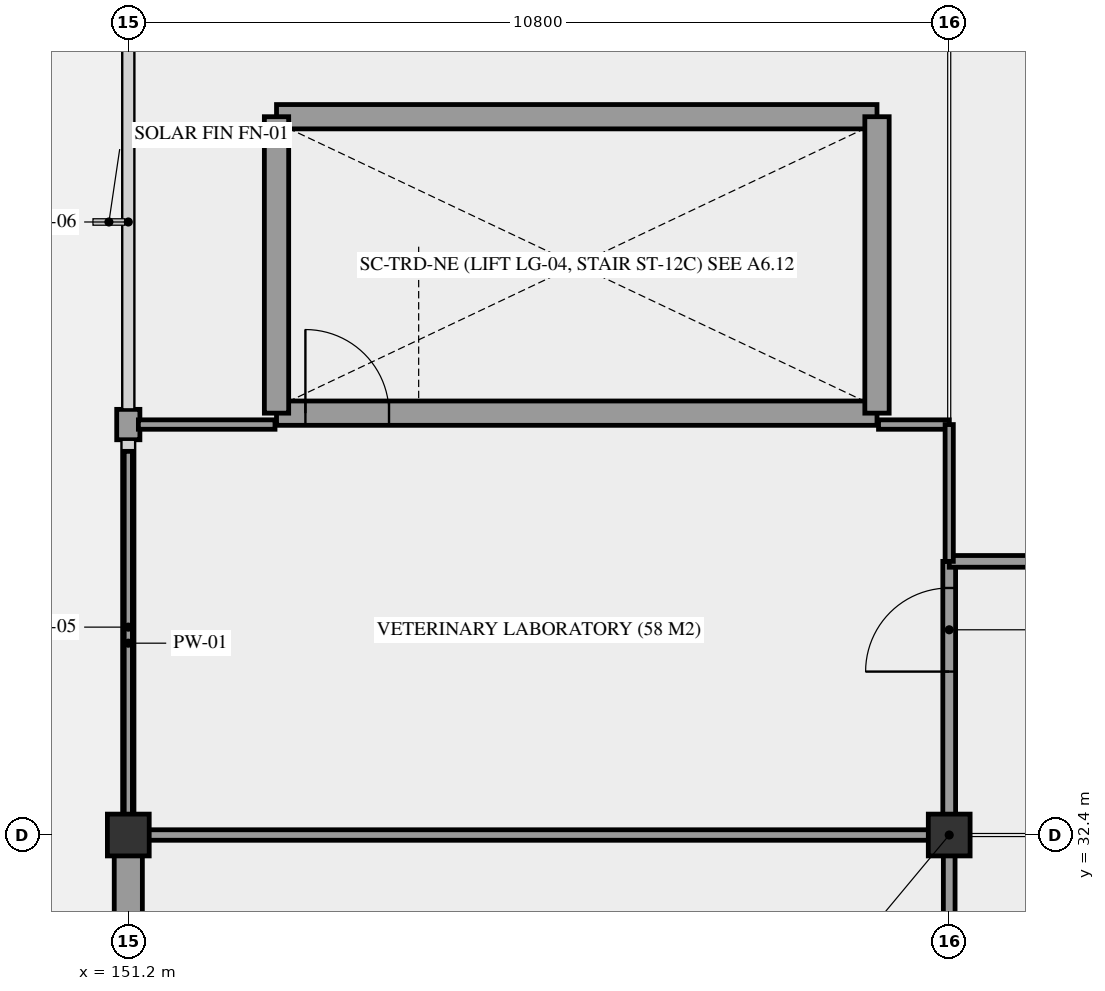
"""IFC4 building model, lengths in metres.
Left out: names, types, materials, properties, quantities, classifications, styles, units other than length and angle.
Written with IfcOpenShell. Run it as: python <this file> out.ifc"""

import sys

from ifc_helpers import new_model, si_unit, direction, frame, frame_2d, origin, origin_2d, place, context, subcontext, project, spatial, rectangle, extrude, element, fill, save


model = new_model("IFC4")
c1 = context("Model", 3, precision=1e-05, world=origin(), true_north=direction((0.0, 1.0)))
c2 = subcontext(c1, "Body", "Model", "MODEL_VIEW")
j1 = project(units=[si_unit("LENGTHUNIT", "METRE"), si_unit("PLANEANGLEUNIT", "RADIAN")], contexts=[c1])
p1 = place(None, origin())
s1 = spatial("IfcSite", under=j1, at=p1, CompositionType="ELEMENT")
p2 = place(p1, origin())
s2 = spatial("IfcBuilding", under=s1, at=p2, CompositionType="ELEMENT")
p3 = place(p2, frame((0.0, 0.0, 14.76)))
s3 = spatial("IfcBuildingStorey", under=s2, at=p3, CompositionType="ELEMENT", Elevation=14.76)
for number, where, z_axis, x_axis in (
    (1, (151.2, 32.4, 0.0), (0.0, 0.0, 1.0), (1.0, 0.0, 0.0)),
    (2, (162.0, 32.4, 0.0), (0.0, 0.0, 1.0), (1.0, 0.0, 0.0)),
):
    element("IfcColumn", number, at=place(p3, frame(where, z_axis=z_axis, x_axis=x_axis)), inside=s3, PredefinedType="COLUMN", context=c2, shape_type="SweptSolid", body=[
        extrude(rectangle(XDim=0.55, YDim=0.55, at=origin_2d()), origin(), (0.0, 0.0, 1.0), 4.32),
    ])
p4 = place(p3, frame((151.2, 21.87, 0.0), z_axis=(0.0, 0.0, 1.0), x_axis=(0.0, 1.0, 0.0)))
e3 = element("IfcWall", 3, at=p4, inside=s3, PredefinedType="STANDARD", context=c2, shape_type="SweptSolid", body=[
    extrude(rectangle(XDim=10.26, YDim=0.37, at=frame_2d((5.13, 0.0))), origin(), (0.0, 0.0, 1.0), 3.17),
])
p5 = place(p4, frame((6.8, 0.0, 0.0)))
e4 = element("IfcOpeningElement", 4, at=p5, cuts=e3, PredefinedType="OPENING", context=c2, shape_type="SweptSolid", body=[
    extrude(rectangle(XDim=1.76, YDim=2.2, at=frame_2d((0.88, 1.1))), frame((0.0, 0.195, 0.0), z_axis=(0.0, -1.0, 0.0), x_axis=(1.0, 0.0, 0.0)), (0.0, 0.0, 1.0), 0.39),
])
p6 = place(p3, frame((151.2, 37.6, 0.0), z_axis=(0.0, 0.0, 1.0), x_axis=(0.0, 1.0, 0.0)))
e5 = element("IfcWall", 5, at=p6, inside=s3, PredefinedType="STANDARD", context=c2, shape_type="SweptSolid", body=[
    extrude(rectangle(XDim=0.4, YDim=0.305, at=frame_2d((0.2, 0.0))), origin(), (0.0, 0.0, 1.0), 3.17),
])
p7 = place(p3, frame((153.15, 37.95, 0.0), z_axis=(0.0, 0.0, 1.0), x_axis=(1.0, 0.0, 0.0)))
e6 = element("IfcWall", 6, at=p7, inside=s3, PredefinedType="SHEAR", context=c2, shape_type="SweptSolid", body=[
    extrude(rectangle(XDim=7.9, YDim=0.32, at=frame_2d((3.95, 0.0))), origin(), (0.0, 0.0, 1.0), 4.32),
])
p8 = place(p7, frame((0.38, 0.0, 0.0)))
e7 = element("IfcOpeningElement", 7, at=p8, cuts=e6, PredefinedType="OPENING", context=c2, shape_type="SweptSolid", body=[
    extrude(rectangle(XDim=1.1, YDim=2.2, at=frame_2d((0.55, 1.1))), frame((0.0, 0.17, 0.0), z_axis=(0.0, -1.0, 0.0), x_axis=(1.0, 0.0, 0.0)), (0.0, 0.0, 1.0), 0.34),
])
p9 = place(p3, frame((153.15, 41.85, 0.0), z_axis=(0.0, 0.0, 1.0), x_axis=(1.0, 0.0, 0.0)))
e8 = element("IfcWall", 8, at=p9, inside=s3, PredefinedType="SHEAR", context=c2, shape_type="SweptSolid", body=[
    extrude(rectangle(XDim=7.9, YDim=0.32, at=frame_2d((3.95, 0.0))), origin(), (0.0, 0.0, 1.0), 4.32),
])
for number, where, z_axis, x_axis in (
    (9, (153.15, 37.95, 0.0), (0.0, 0.0, 1.0), (0.0, 1.0, 0.0)),
    (10, (161.05, 37.95, 0.0), (0.0, 0.0, 1.0), (0.0, 1.0, 0.0)),
):
    element("IfcWall", number, at=place(p3, frame(where, z_axis=z_axis, x_axis=x_axis)), inside=s3, PredefinedType="SHEAR", context=c2, shape_type="SweptSolid", body=[
        extrude(rectangle(XDim=3.9, YDim=0.32, at=frame_2d((1.95, 0.0))), origin(), (0.0, 0.0, 1.0), 4.32),
    ])
p10 = place(p3, frame((162.0, 21.6, 0.0), z_axis=(0.0, 0.0, 1.0), x_axis=(0.0, 1.0, 0.0)))
e11 = element("IfcWall", 11, at=p10, inside=s3, PredefinedType="PARTITIONING", context=c2, shape_type="SweptSolid", body=[
    extrude(rectangle(XDim=10.8, YDim=0.154, at=frame_2d((5.4, 0.0))), origin(), (0.0, 0.0, 1.0), 2.87),
])
p11 = place(p10, frame((8.356, 0.0, 0.0)))
e12 = element("IfcOpeningElement", 12, at=p11, cuts=e11, PredefinedType="OPENING", context=c2, shape_type="SweptSolid", body=[
    extrude(rectangle(XDim=1.0, YDim=2.15, at=frame_2d((0.5, 1.075))), frame((0.0, 0.087, 0.0), z_axis=(0.0, -1.0, 0.0), x_axis=(1.0, 0.0, 0.0)), (0.0, 0.0, 1.0), 0.174),
])
p12 = place(p3, frame((162.0, 32.4, 0.0), z_axis=(0.0, 0.0, 1.0), x_axis=(0.0, 1.0, 0.0)))
e13 = element("IfcWall", 13, at=p12, inside=s3, PredefinedType="PARTITIONING", context=c2, shape_type="SweptSolid", body=[
    extrude(rectangle(XDim=3.6, YDim=0.168, at=frame_2d((1.8, 0.0))), origin(), (0.0, 0.0, 1.0), 2.87),
])
p13 = place(p12, frame((2.15, 0.0, 0.0)))
e14 = element("IfcOpeningElement", 14, at=p13, cuts=e13, PredefinedType="OPENING", context=c2, shape_type="SweptSolid", body=[
    extrude(rectangle(XDim=1.1, YDim=2.2, at=frame_2d((0.55, 1.1))), frame((0.0, 0.094, 0.0), z_axis=(0.0, -1.0, 0.0), x_axis=(1.0, 0.0, 0.0)), (0.0, 0.0, 1.0), 0.188),
])
p14 = place(p3, frame((151.2, 32.4, 0.0), z_axis=(0.0, 0.0, 1.0), x_axis=(1.0, 0.0, 0.0)))
e15 = element("IfcWall", 15, at=p14, inside=s3, PredefinedType="PARTITIONING", context=c2, shape_type="SweptSolid", body=[
    extrude(rectangle(XDim=10.8, YDim=0.138, at=frame_2d((5.4, 0.0))), origin(), (0.0, 0.0, 1.0), 2.87),
])
p15 = place(p3, frame((151.2, 32.4, 0.0), z_axis=(0.0, 0.0, 1.0), x_axis=(0.0, 1.0, 0.0)))
e16 = element("IfcWall", 16, at=p15, inside=s3, PredefinedType="PARTITIONING", context=c2, shape_type="SweptSolid", body=[
    extrude(rectangle(XDim=5.048, YDim=0.108, at=frame_2d((2.524, 0.0))), origin(), (0.0, 0.0, 1.0), 2.87),
])
p16 = place(p3, frame((151.333, 37.8, 0.0), z_axis=(0.0, 0.0, 1.0), x_axis=(1.0, 0.0, 0.0)))
e17 = element("IfcWall", 17, at=p16, inside=s3, PredefinedType="PARTITIONING", context=c2, shape_type="SweptSolid", body=[
    extrude(rectangle(XDim=1.797, YDim=0.124, at=frame_2d((0.899, 0.0))), origin(), (0.0, 0.0, 1.0), 2.87),
])
p17 = place(p3, frame((161.07, 37.8, 0.0), z_axis=(0.0, 0.0, 1.0), x_axis=(1.0, 0.0, 0.0)))
e18 = element("IfcWall", 18, at=p17, inside=s3, PredefinedType="PARTITIONING", context=c2, shape_type="SweptSolid", body=[
    extrude(rectangle(XDim=0.93, YDim=0.124, at=frame_2d((0.465, 0.0))), origin(), (0.0, 0.0, 1.0), 2.87),
])
p18 = place(p3, frame((162.0, 36.0, 0.0), z_axis=(0.0, 0.0, 1.0), x_axis=(1.0, 0.0, 0.0)))
e19 = element("IfcWall", 19, at=p18, inside=s3, PredefinedType="PARTITIONING", context=c2, shape_type="SweptSolid", body=[
    extrude(rectangle(XDim=3.58, YDim=0.154, at=frame_2d((1.79, 0.0))), origin(), (0.0, 0.0, 1.0), 2.87),
])
p19 = place(p3, frame((162.0, 36.0, 0.0), z_axis=(0.0, 0.0, 1.0), x_axis=(0.0, 1.0, 0.0)))
e20 = element("IfcWall", 20, at=p19, inside=s3, PredefinedType="PARTITIONING", context=c2, shape_type="SweptSolid", body=[
    extrude(rectangle(XDim=1.8, YDim=0.108, at=frame_2d((0.9, 0.0))), origin(), (0.0, 0.0, 1.0), 2.87),
])
p20 = place(p8, frame((1.1, 0.0, 0.0), z_axis=(0.0, 0.0, 1.0), x_axis=(-1.0, 0.0, 0.0)))
e21 = element("IfcDoor", 21, at=p20, inside=s3, OperationType="SINGLE_SWING_LEFT", PredefinedType="DOOR", context=c2, shape_type="SweptSolid", body=[
    extrude(rectangle(XDim=1.1, YDim=2.2, at=frame_2d((0.55, 1.1))), frame((0.0, 0.025, 0.0), z_axis=(0.0, -1.0, 0.0), x_axis=(1.0, 0.0, 0.0)), (0.0, 0.0, 1.0), 0.05),
])
fill(e7, e21)
p21 = place(p13, origin())
e22 = element("IfcDoor", 22, at=p21, inside=s3, OperationType="SINGLE_SWING_LEFT", PredefinedType="DOOR", context=c2, shape_type="SweptSolid", body=[
    extrude(rectangle(XDim=1.1, YDim=2.2, at=frame_2d((0.55, 1.1))), frame((0.0, 0.025, 0.0), z_axis=(0.0, -1.0, 0.0), x_axis=(1.0, 0.0, 0.0)), (0.0, 0.0, 1.0), 0.05),
])
fill(e14, e22)
save(model, sys.argv[1])
